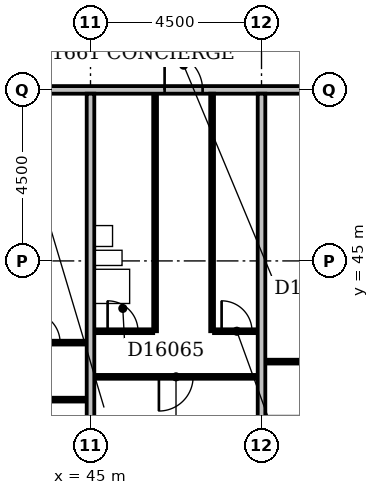
"""IFC4 building model, lengths in metres.
Left out: names, types, materials, properties, quantities, classifications, styles, units other than length and angle.
Written with IfcOpenShell. Run it as: python <this file> out.ifc"""

import sys

from ifc_helpers import new_model, si_unit, direction, frame, frame_2d, origin, place, context, subcontext, project, spatial, rectangle, extrude, element, fill, save


model = new_model("IFC4")
c1 = context("Model", 3, precision=1e-05, world=origin(), true_north=direction((0.0, 1.0)))
c2 = subcontext(c1, "Body", "Model", "MODEL_VIEW")
j1 = project(units=[si_unit("LENGTHUNIT", "METRE"), si_unit("PLANEANGLEUNIT", "RADIAN")], contexts=[c1])
p1 = place(None, origin())
s1 = spatial("IfcSite", under=j1, at=p1, CompositionType="ELEMENT")
p2 = place(p1, origin())
s2 = spatial("IfcBuilding", under=s1, at=p2, CompositionType="ELEMENT")
p3 = place(p2, frame((0.0, 0.0, 68.6)))
s3 = spatial("IfcBuildingStorey", under=s2, at=p3, CompositionType="ELEMENT", Elevation=68.6)
p4 = place(p3, frame((45.0, 36.6, 0.0), z_axis=(0.0, 0.0, 1.0), x_axis=(0.0, 1.0, 0.0)))
e1 = element("IfcWall", 1, at=p4, inside=s3, PredefinedType="PARTITIONING", context=c2, shape_type="SweptSolid", body=[
    extrude(rectangle(XDim=12.8, YDim=0.2, at=frame_2d((6.4, 0.0))), origin(), (0.0, 0.0, 1.0), 2.6),
])
p5 = place(p3, frame((49.5, 36.6, 0.0), z_axis=(0.0, 0.0, 1.0), x_axis=(0.0, 1.0, 0.0)))
e2 = element("IfcWall", 2, at=p5, inside=s3, PredefinedType="PARTITIONING", context=c2, shape_type="SweptSolid", body=[
    extrude(rectangle(XDim=12.8, YDim=0.2, at=frame_2d((6.4, 0.0))), origin(), (0.0, 0.0, 1.0), 3.3),
])
p6 = place(p3, frame((36.1, 41.35, 0.0), z_axis=(0.0, 0.0, 1.0), x_axis=(1.0, 0.0, 0.0)))
e3 = element("IfcWall", 3, at=p6, inside=s3, PredefinedType="PARTITIONING", context=c2, shape_type="SweptSolid", body=[
    extrude(rectangle(XDim=8.8, YDim=0.1, at=frame_2d((4.4, 0.0))), origin(), (0.0, 0.0, 1.0), 3.3),
])
p7 = place(p6, frame((1.7, 0.0, 0.0)))
e4 = element("IfcOpeningElement", 4, at=p7, cuts=e3, PredefinedType="OPENING", context=c2, shape_type="SweptSolid", body=[
    extrude(rectangle(XDim=0.9, YDim=2.1, at=frame_2d((0.45, 1.05))), frame((0.0, 0.062, 0.0), z_axis=(0.0, -1.0, 0.0), x_axis=(1.0, 0.0, 0.0)), (0.0, 0.0, 1.0), 0.124),
])
p8 = place(p6, frame((5.05, 0.0, 0.0)))
e5 = element("IfcOpeningElement", 5, at=p8, cuts=e3, PredefinedType="OPENING", context=c2, shape_type="SweptSolid", body=[
    extrude(rectangle(XDim=0.9, YDim=2.1, at=frame_2d((0.45, 1.05))), frame((0.0, 0.062, 0.0), z_axis=(0.0, -1.0, 0.0), x_axis=(1.0, 0.0, 0.0)), (0.0, 0.0, 1.0), 0.124),
])
p9 = place(p3, frame((45.1, 41.95, 0.0), z_axis=(0.0, 0.0, 1.0), x_axis=(1.0, 0.0, 0.0)))
e6 = element("IfcWall", 6, at=p9, inside=s3, PredefinedType="PARTITIONING", context=c2, shape_type="SweptSolid", body=[
    extrude(rectangle(XDim=4.3, YDim=0.1, at=frame_2d((2.15, 0.0))), origin(), (0.0, 0.0, 1.0), 3.3),
])
p10 = place(p9, frame((1.7, 0.0, 0.0)))
e7 = element("IfcOpeningElement", 7, at=p10, cuts=e6, PredefinedType="OPENING", context=c2, shape_type="SweptSolid", body=[
    extrude(rectangle(XDim=0.9, YDim=2.1, at=frame_2d((0.45, 1.05))), frame((0.0, 0.062, 0.0), z_axis=(0.0, -1.0, 0.0), x_axis=(1.0, 0.0, 0.0)), (0.0, 0.0, 1.0), 0.124),
])
p11 = place(p3, frame((49.6, 42.35, 0.0), z_axis=(0.0, 0.0, 1.0), x_axis=(1.0, 0.0, 0.0)))
e8 = element("IfcWall", 8, at=p11, inside=s3, PredefinedType="PARTITIONING", context=c2, shape_type="SweptSolid", body=[
    extrude(rectangle(XDim=4.85, YDim=0.1, at=frame_2d((2.425, 0.0))), origin(), (0.0, 0.0, 1.0), 3.3),
])
p12 = place(p11, frame((1.95, 0.0, 0.0)))
e9 = element("IfcOpeningElement", 9, at=p12, cuts=e8, PredefinedType="OPENING", context=c2, shape_type="SweptSolid", body=[
    extrude(rectangle(XDim=0.9, YDim=2.1, at=frame_2d((0.45, 1.05))), frame((0.0, 0.062, 0.0), z_axis=(0.0, -1.0, 0.0), x_axis=(1.0, 0.0, 0.0)), (0.0, 0.0, 1.0), 0.124),
])
p13 = place(p3, frame((42.65, 42.85, 0.0), z_axis=(0.0, 0.0, 1.0), x_axis=(1.0, 0.0, 0.0)))
e10 = element("IfcWall", 10, at=p13, inside=s3, PredefinedType="PARTITIONING", context=c2, shape_type="SweptSolid", body=[
    extrude(rectangle(XDim=2.25, YDim=0.1, at=frame_2d((1.125, 0.0))), origin(), (0.0, 0.0, 1.0), 3.3),
])
p14 = place(p13, frame((0.75, 0.0, 0.0)))
e11 = element("IfcOpeningElement", 11, at=p14, cuts=e10, PredefinedType="OPENING", context=c2, shape_type="SweptSolid", body=[
    extrude(rectangle(XDim=0.8, YDim=2.1, at=frame_2d((0.4, 1.05))), frame((0.0, 0.062, 0.0), z_axis=(0.0, -1.0, 0.0), x_axis=(1.0, 0.0, 0.0)), (0.0, 0.0, 1.0), 0.124),
])
p15 = place(p3, frame((45.1, 43.15, 0.0), z_axis=(0.0, 0.0, 1.0), x_axis=(1.0, 0.0, 0.0)))
e12 = element("IfcWall", 12, at=p15, inside=s3, PredefinedType="PARTITIONING", context=c2, shape_type="SweptSolid", body=[
    extrude(rectangle(XDim=1.55, YDim=0.1, at=frame_2d((0.775, 0.0))), origin(), (0.0, 0.0, 1.0), 3.3),
])
p16 = place(p15, frame((0.35, 0.0, 0.0)))
e13 = element("IfcOpeningElement", 13, at=p16, cuts=e12, PredefinedType="OPENING", context=c2, shape_type="SweptSolid", body=[
    extrude(rectangle(XDim=0.8, YDim=2.1, at=frame_2d((0.4, 1.05))), frame((0.0, 0.062, 0.0), z_axis=(0.0, -1.0, 0.0), x_axis=(1.0, 0.0, 0.0)), (0.0, 0.0, 1.0), 0.124),
])
p17 = place(p3, frame((46.7, 43.15, 0.0), z_axis=(0.0, 0.0, 1.0), x_axis=(0.0, 1.0, 0.0)))
e14 = element("IfcWall", 14, at=p17, inside=s3, PredefinedType="PLUMBINGWALL", context=c2, shape_type="SweptSolid", body=[
    extrude(rectangle(XDim=6.25, YDim=0.1, at=frame_2d((3.125, 0.0))), origin(), (0.0, 0.0, 1.0), 3.3),
])
p18 = place(p3, frame((48.2, 43.15, 0.0), z_axis=(0.0, 0.0, 1.0), x_axis=(0.0, 1.0, 0.0)))
e15 = element("IfcWall", 15, at=p18, inside=s3, PredefinedType="PARTITIONING", context=c2, shape_type="SweptSolid", body=[
    extrude(rectangle(XDim=6.25, YDim=0.1, at=frame_2d((3.125, 0.0))), origin(), (0.0, 0.0, 1.0), 3.3),
])
p19 = place(p3, frame((48.25, 43.15, 0.0), z_axis=(0.0, 0.0, 1.0), x_axis=(1.0, 0.0, 0.0)))
e16 = element("IfcWall", 16, at=p19, inside=s3, PredefinedType="PARTITIONING", context=c2, shape_type="SweptSolid", body=[
    extrude(rectangle(XDim=1.15, YDim=0.1, at=frame_2d((0.575, 0.0))), origin(), (0.0, 0.0, 1.0), 3.3),
])
p20 = place(p19, frame((0.2, 0.0, 0.0)))
e17 = element("IfcOpeningElement", 17, at=p20, cuts=e16, PredefinedType="OPENING", context=c2, shape_type="SweptSolid", body=[
    extrude(rectangle(XDim=0.8, YDim=2.1, at=frame_2d((0.4, 1.05))), frame((0.0, 0.062, 0.0), z_axis=(0.0, -1.0, 0.0), x_axis=(1.0, 0.0, 0.0)), (0.0, 0.0, 1.0), 0.124),
])
p21 = place(p3, frame((9.1, 49.5, 0.0), z_axis=(0.0, 0.0, 1.0), x_axis=(1.0, 0.0, 0.0)))
e18 = element("IfcWall", 18, at=p21, inside=s3, PredefinedType="PARTITIONING", context=c2, shape_type="SweptSolid", body=[
    extrude(rectangle(XDim=57.8, YDim=0.2, at=frame_2d((28.9, 0.0))), origin(), (0.0, 0.0, 1.0), 3.3),
])
p22 = place(p21, frame((13.7, 0.0, 0.0)))
e19 = element("IfcOpeningElement", 19, at=p22, cuts=e18, PredefinedType="OPENING", context=c2, shape_type="SweptSolid", body=[
    extrude(rectangle(XDim=1.0, YDim=2.1, at=frame_2d((0.5, 1.05))), frame((0.0, 0.112, 0.0), z_axis=(0.0, -1.0, 0.0), x_axis=(1.0, 0.0, 0.0)), (0.0, 0.0, 1.0), 0.224),
])
p23 = place(p21, frame((32.2, 0.0, 0.0)))
e20 = element("IfcOpeningElement", 20, at=p23, cuts=e18, PredefinedType="OPENING", context=c2, shape_type="SweptSolid", body=[
    extrude(rectangle(XDim=1.0, YDim=2.1, at=frame_2d((0.5, 1.05))), frame((0.0, 0.112, 0.0), z_axis=(0.0, -1.0, 0.0), x_axis=(1.0, 0.0, 0.0)), (0.0, 0.0, 1.0), 0.224),
])
p24 = place(p21, frame((37.85, 0.0, 0.0)))
e21 = element("IfcOpeningElement", 21, at=p24, cuts=e18, PredefinedType="OPENING", context=c2, shape_type="SweptSolid", body=[
    extrude(rectangle(XDim=1.0, YDim=2.1, at=frame_2d((0.5, 1.05))), frame((0.0, 0.112, 0.0), z_axis=(0.0, -1.0, 0.0), x_axis=(1.0, 0.0, 0.0)), (0.0, 0.0, 1.0), 0.224),
])
p25 = place(p21, frame((45.7, 0.0, 0.0)))
e22 = element("IfcOpeningElement", 22, at=p25, cuts=e18, PredefinedType="OPENING", context=c2, shape_type="SweptSolid", body=[
    extrude(rectangle(XDim=1.0, YDim=2.1, at=frame_2d((0.5, 1.05))), frame((0.0, 0.112, 0.0), z_axis=(0.0, -1.0, 0.0), x_axis=(1.0, 0.0, 0.0)), (0.0, 0.0, 1.0), 0.224),
])
p26 = place(p21, frame((49.7, 0.0, 0.0)))
e23 = element("IfcOpeningElement", 23, at=p26, cuts=e18, PredefinedType="OPENING", context=c2, shape_type="SweptSolid", body=[
    extrude(rectangle(XDim=1.0, YDim=2.1, at=frame_2d((0.5, 1.05))), frame((0.0, 0.112, 0.0), z_axis=(0.0, -1.0, 0.0), x_axis=(1.0, 0.0, 0.0)), (0.0, 0.0, 1.0), 0.224),
])
p27 = place(p21, frame((8.4, 0.0, 0.0)))
e24 = element("IfcOpeningElement", 24, at=p27, cuts=e18, PredefinedType="OPENING", context=c2, shape_type="SweptSolid", body=[
    extrude(rectangle(XDim=0.9, YDim=2.1, at=frame_2d((0.45, 1.05))), frame((0.0, 0.112, 0.0), z_axis=(0.0, -1.0, 0.0), x_axis=(1.0, 0.0, 0.0)), (0.0, 0.0, 1.0), 0.224),
])
p28 = place(p10, frame((0.9, 0.0, 0.0), z_axis=(0.0, 0.0, 1.0), x_axis=(-1.0, 0.0, 0.0)))
e25 = element("IfcDoor", 25, at=p28, inside=s3, OperationType="SINGLE_SWING_RIGHT", PredefinedType="DOOR", context=c2, shape_type="SweptSolid", body=[
    extrude(rectangle(XDim=0.9, YDim=2.1, at=frame_2d((0.45, 1.05))), frame((0.0, 0.025, 0.0), z_axis=(0.0, -1.0, 0.0), x_axis=(1.0, 0.0, 0.0)), (0.0, 0.0, 1.0), 0.05),
])
fill(e7, e25)
p29 = place(p14, origin())
e26 = element("IfcDoor", 26, at=p29, inside=s3, OperationType="SINGLE_SWING_LEFT", PredefinedType="DOOR", context=c2, shape_type="SweptSolid", body=[
    extrude(rectangle(XDim=0.8, YDim=2.1, at=frame_2d((0.4, 1.05))), frame((0.0, 0.025, 0.0), z_axis=(0.0, -1.0, 0.0), x_axis=(1.0, 0.0, 0.0)), (0.0, 0.0, 1.0), 0.05),
])
fill(e11, e26)
p30 = place(p16, origin())
e27 = element("IfcDoor", 27, at=p30, inside=s3, OperationType="SINGLE_SWING_LEFT", PredefinedType="DOOR", context=c2, shape_type="SweptSolid", body=[
    extrude(rectangle(XDim=0.8, YDim=2.1, at=frame_2d((0.4, 1.05))), frame((0.0, 0.025, 0.0), z_axis=(0.0, -1.0, 0.0), x_axis=(1.0, 0.0, 0.0)), (0.0, 0.0, 1.0), 0.05),
])
fill(e13, e27)
p31 = place(p20, origin())
e28 = element("IfcDoor", 28, at=p31, inside=s3, OperationType="SINGLE_SWING_LEFT", PredefinedType="DOOR", context=c2, shape_type="SweptSolid", body=[
    extrude(rectangle(XDim=0.8, YDim=2.1, at=frame_2d((0.4, 1.05))), frame((0.0, 0.025, 0.0), z_axis=(0.0, -1.0, 0.0), x_axis=(1.0, 0.0, 0.0)), (0.0, 0.0, 1.0), 0.05),
])
fill(e17, e28)
p32 = place(p24, origin())
e29 = element("IfcDoor", 29, at=p32, inside=s3, OperationType="SINGLE_SWING_LEFT", PredefinedType="DOOR", context=c2, shape_type="SweptSolid", body=[
    extrude(rectangle(XDim=1.0, YDim=2.1, at=frame_2d((0.5, 1.05))), frame((0.0, 0.025, 0.0), z_axis=(0.0, -1.0, 0.0), x_axis=(1.0, 0.0, 0.0)), (0.0, 0.0, 1.0), 0.05),
])
fill(e21, e29)
save(model, sys.argv[1])
